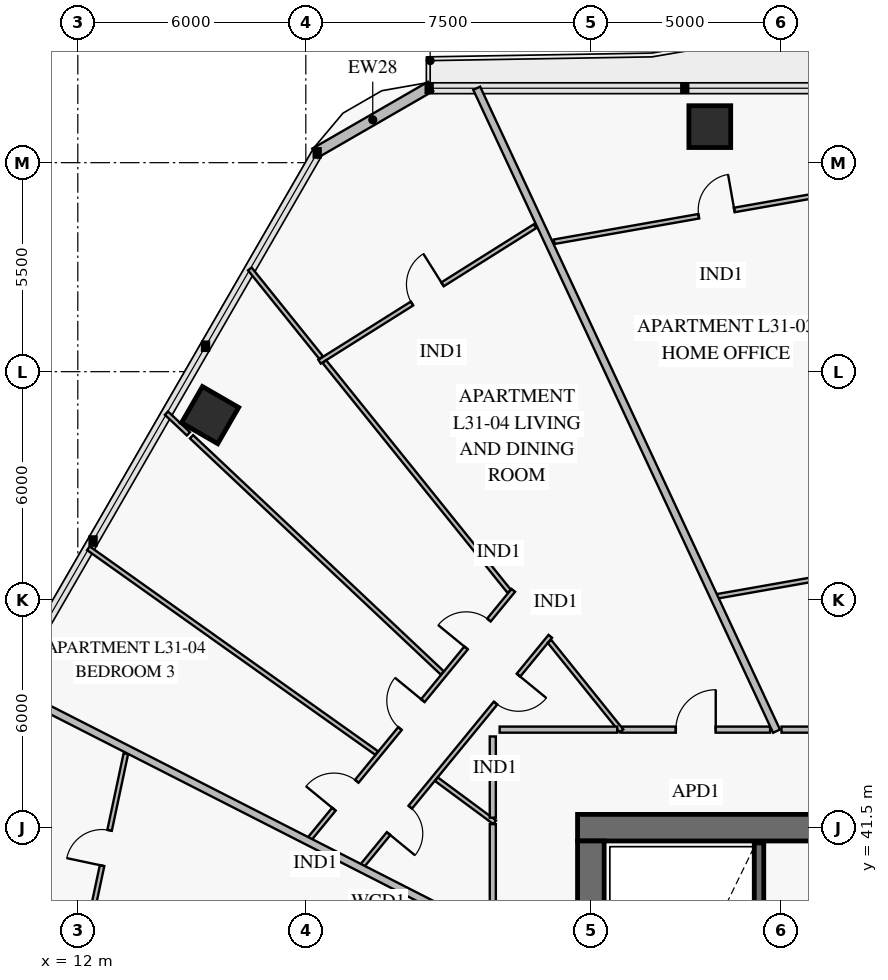
"""IFC4 building model, lengths in metres.
Left out: names, types, materials, properties, quantities, classifications, styles, units other than length and angle.
Written with IfcOpenShell. Run it as: python <this file> out.ifc"""

import sys

from ifc_helpers import new_model, si_unit, direction, frame, frame_2d, origin, origin_2d, place, context, subcontext, project, spatial, rectangle, extrude, element, fill, save


model = new_model("IFC4")
c1 = context("Model", 3, precision=1e-05, world=origin(), true_north=direction((0.0, 1.0)))
c2 = subcontext(c1, "Body", "Model", "MODEL_VIEW")
j1 = project(units=[si_unit("LENGTHUNIT", "METRE"), si_unit("PLANEANGLEUNIT", "RADIAN")], contexts=[c1])
p1 = place(None, origin())
s1 = spatial("IfcSite", under=j1, at=p1, CompositionType="ELEMENT")
p2 = place(p1, origin())
s2 = spatial("IfcBuilding", under=s1, at=p2, CompositionType="ELEMENT")
p3 = place(p2, frame((0.0, 0.0, 126.6)))
s3 = spatial("IfcBuildingStorey", under=s2, at=p3, CompositionType="ELEMENT", Elevation=126.6)
p4 = place(p3, frame((36.75, 41.5, 0.0), z_axis=(0.0, 0.0, 1.0), x_axis=(-1.0, 0.0, 0.0)))
e1 = element("IfcWall", 1, at=p4, inside=s3, PredefinedType="SHEAR", context=c2, shape_type="SweptSolid", body=[
    extrude(rectangle(XDim=11.6, YDim=0.7, at=frame_2d((5.8, 0.0))), origin(), (0.0, 0.0, 1.0), 3.8),
])
p5 = place(p4, frame((4.25, 0.0, 0.0)))
e2 = element("IfcOpeningElement", 2, at=p5, cuts=e1, PredefinedType="OPENING", context=c2, shape_type="SweptSolid", body=[
    extrude(rectangle(XDim=1.1, YDim=2.15, at=frame_2d((0.55, 1.075))), frame((0.0, 0.362, 0.0), z_axis=(0.0, -1.0, 0.0), x_axis=(1.0, 0.0, 0.0)), (0.0, 0.0, 1.0), 0.724),
])
p6 = place(p3, frame((25.5, 22.85, 0.0), z_axis=(0.0, 0.0, 1.0), x_axis=(0.0, 1.0, 0.0)))
e3 = element("IfcWall", 3, at=p6, inside=s3, PredefinedType="SHEAR", context=c2, shape_type="SweptSolid", body=[
    extrude(rectangle(XDim=18.3, YDim=0.7, at=frame_2d((9.15, 0.0))), origin(), (0.0, 0.0, 1.0), 3.8),
])
p7 = place(p6, frame((8.9, 0.0, 0.0)))
e4 = element("IfcOpeningElement", 4, at=p7, cuts=e3, PredefinedType="OPENING", context=c2, shape_type="SweptSolid", body=[
    extrude(rectangle(XDim=1.1, YDim=2.15, at=frame_2d((0.55, 1.075))), frame((0.0, 0.362, 0.0), z_axis=(0.0, -1.0, 0.0), x_axis=(1.0, 0.0, 0.0)), (0.0, 0.0, 1.0), 0.724),
])
for number, where, z_axis, x_axis in (
    (5, (28.63, 59.948, 0.0), (0.0, 0.0, 1.0), (-1.0, 0.0, 0.0)),
    (6, (15.481, 52.357, 0.0), (0.0, 0.0, 1.0), (-0.5, -0.866, 0.0)),
):
    element("IfcColumn", number, at=place(p3, frame(where, z_axis=z_axis, x_axis=x_axis)), inside=s3, PredefinedType="COLUMN", context=c2, shape_type="SweptSolid", body=[
        extrude(rectangle(XDim=1.1, YDim=1.1, at=origin_2d()), origin(), (0.0, 0.0, 1.0), 3.55),
    ])
p8 = place(p3, frame((18.239, 59.249, 0.0), z_axis=(0.0, 0.0, 1.0), x_axis=(0.866007452331, 0.500031091541, 0.0)))
e7 = element("IfcWall", 7, at=p8, inside=s3, PredefinedType="SOLIDWALL", context=c2, shape_type="SweptSolid", body=[
    extrude(rectangle(XDim=3.515, YDim=0.28, at=frame_2d((1.757, 0.0))), origin(), (0.0, 0.0, 1.0), 3.55),
])
p9 = place(p3, frame((29.925, 31.4, 0.0), z_axis=(0.0, 0.0, 1.0), x_axis=(0.0, 1.0, 0.0)))
e8 = element("IfcWall", 8, at=p9, inside=s3, PredefinedType="SOLIDWALL", context=c2, shape_type="SweptSolid", body=[
    extrude(rectangle(XDim=9.7, YDim=0.25, at=frame_2d((4.85, 0.0))), origin(), (0.0, 0.0, 1.0), 3.8),
])
p10 = place(p3, frame((32.915, 58.397, 0.0), z_axis=(0.0, 0.0, 1.0), x_axis=(-0.984808385469, -0.17364459079, 0.0)))
e9 = element("IfcWall", 9, at=p10, inside=s3, PredefinedType="PARTITIONING", context=c2, shape_type="SweptSolid", body=[
    extrude(rectangle(XDim=8.51, YDim=0.12, at=frame_2d((4.255, 0.0))), origin(), (0.0, 0.0, 1.0), 2.85),
])
p11 = place(p10, frame((3.696, 0.0, 0.0)))
e10 = element("IfcOpeningElement", 10, at=p11, cuts=e9, PredefinedType="OPENING", context=c2, shape_type="SweptSolid", body=[
    extrude(rectangle(XDim=0.95, YDim=2.1, at=frame_2d((0.475, 1.05))), frame((0.0, 0.072, 0.0), z_axis=(0.0, -1.0, 0.0), x_axis=(1.0, 0.0, 0.0)), (0.0, 0.0, 1.0), 0.144),
])
p12 = place(p3, frame((24.03, 57.328, 0.0), z_axis=(0.0, 0.0, 1.0), x_axis=(-0.846561448229, -0.532291005346, 0.0)))
e11 = element("IfcWall", 11, at=p12, inside=s3, PredefinedType="PARTITIONING", context=c2, shape_type="SweptSolid", body=[
    extrude(rectangle(XDim=6.697, YDim=0.12, at=frame_2d((3.348, 0.0))), origin(), (0.0, 0.0, 1.0), 2.8),
])
p13 = place(p12, frame((2.873, 0.0, 0.0)))
e12 = element("IfcOpeningElement", 12, at=p13, cuts=e11, PredefinedType="OPENING", context=c2, shape_type="SweptSolid", body=[
    extrude(rectangle(XDim=0.95, YDim=2.1, at=frame_2d((0.475, 1.05))), frame((0.0, 0.072, 0.0), z_axis=(0.0, -1.0, 0.0), x_axis=(1.0, 0.0, 0.0)), (0.0, 0.0, 1.0), 0.144),
])
p14 = place(p3, frame((24.433, 46.536, 0.0), z_axis=(0.0, 0.0, 1.0), x_axis=(-0.633934690798, -0.773386583671, 0.0)))
e13 = element("IfcWall", 13, at=p14, inside=s3, PredefinedType="PARTITIONING", context=c2, shape_type="SweptSolid", body=[
    extrude(rectangle(XDim=7.819, YDim=0.12, at=frame_2d((3.909, 0.0))), origin(), (0.0, 0.0, 1.0), 2.85),
])
p15 = place(p14, frame((1.321, 0.0, 0.0)))
e14 = element("IfcOpeningElement", 14, at=p15, cuts=e13, PredefinedType="OPENING", context=c2, shape_type="SweptSolid", body=[
    extrude(rectangle(XDim=0.95, YDim=2.1, at=frame_2d((0.475, 1.05))), frame((0.0, 0.072, 0.0), z_axis=(0.0, -1.0, 0.0), x_axis=(1.0, 0.0, 0.0)), (0.0, 0.0, 1.0), 0.144),
])
p16 = place(p14, frame((5.813, 0.0, 0.0)))
e15 = element("IfcOpeningElement", 15, at=p16, cuts=e13, PredefinedType="OPENING", context=c2, shape_type="SweptSolid", body=[
    extrude(rectangle(XDim=0.9, YDim=2.1, at=frame_2d((0.45, 1.05))), frame((0.0, 0.072, 0.0), z_axis=(0.0, -1.0, 0.0), x_axis=(1.0, 0.0, 0.0)), (0.0, 0.0, 1.0), 0.144),
])
p17 = place(p3, frame((23.459, 47.746, 0.0), z_axis=(0.0, 0.0, 1.0), x_axis=(-0.633918329218, -0.773399994751, 0.0)))
e16 = element("IfcWall", 16, at=p17, inside=s3, PredefinedType="PARTITIONING", context=c2, shape_type="SweptSolid", body=[
    extrude(rectangle(XDim=8.456, YDim=0.12, at=frame_2d((4.228, 0.0))), origin(), (0.0, 0.0, 1.0), 2.85),
])
p18 = place(p17, frame((1.01, 0.0, 0.0)))
e17 = element("IfcOpeningElement", 17, at=p18, cuts=e16, PredefinedType="OPENING", context=c2, shape_type="SweptSolid", body=[
    extrude(rectangle(XDim=0.95, YDim=2.1, at=frame_2d((0.475, 1.05))), frame((0.0, 0.072, 0.0), z_axis=(0.0, -1.0, 0.0), x_axis=(1.0, 0.0, 0.0)), (0.0, 0.0, 1.0), 0.144),
])
p19 = place(p17, frame((3.753, 0.0, 0.0)))
e18 = element("IfcOpeningElement", 18, at=p19, cuts=e16, PredefinedType="OPENING", context=c2, shape_type="SweptSolid", body=[
    extrude(rectangle(XDim=0.95, YDim=2.1, at=frame_2d((0.475, 1.05))), frame((0.0, 0.072, 0.0), z_axis=(0.0, -1.0, 0.0), x_axis=(1.0, 0.0, 0.0)), (0.0, 0.0, 1.0), 0.144),
])
p20 = place(p17, frame((6.496, 0.0, 0.0)))
e19 = element("IfcOpeningElement", 19, at=p20, cuts=e16, PredefinedType="OPENING", context=c2, shape_type="SweptSolid", body=[
    extrude(rectangle(XDim=0.95, YDim=2.1, at=frame_2d((0.475, 1.05))), frame((0.0, 0.072, 0.0), z_axis=(0.0, -1.0, 0.0), x_axis=(1.0, 0.0, 0.0)), (0.0, 0.0, 1.0), 0.144),
])
p21 = place(p3, frame((30.216, 44.08, 0.0), z_axis=(0.0, 0.0, 1.0), x_axis=(-1.0, 0.0, 0.0)))
e20 = element("IfcWall", 20, at=p21, inside=s3, PredefinedType="PARTITIONING", context=c2, shape_type="SweptSolid", body=[
    extrude(rectangle(XDim=3.91, YDim=0.16, at=frame_2d((1.955, 0.0))), origin(), (0.0, 0.0, 1.0), 3.55),
])
p22 = place(p21, frame((1.43, 0.0, 0.0)))
e21 = element("IfcOpeningElement", 21, at=p22, cuts=e20, PredefinedType="OPENING", context=c2, shape_type="SweptSolid", body=[
    extrude(rectangle(XDim=1.05, YDim=2.15, at=frame_2d((0.525, 1.075))), frame((0.0, 0.092, 0.0), z_axis=(0.0, -1.0, 0.0), x_axis=(1.0, 0.0, 0.0)), (0.0, 0.0, 1.0), 0.184),
])
p23 = place(p3, frame((13.265, 43.447, 0.0), z_axis=(0.0, 0.0, 1.0), x_axis=(-0.207901923905, -0.978149676704, 0.0)))
e22 = element("IfcWall", 22, at=p23, inside=s3, PredefinedType="PARTITIONING", context=c2, shape_type="SweptSolid", body=[
    extrude(rectangle(XDim=5.073, YDim=0.12, at=frame_2d((2.537, 0.0))), origin(), (0.0, 0.0, 1.0), 2.85),
])
p24 = place(p23, frame((2.062, 0.0, 0.0)))
e23 = element("IfcOpeningElement", 23, at=p24, cuts=e22, PredefinedType="OPENING", context=c2, shape_type="SweptSolid", body=[
    extrude(rectangle(XDim=0.95, YDim=2.1, at=frame_2d((0.475, 1.05))), frame((0.0, 0.072, 0.0), z_axis=(0.0, -1.0, 0.0), x_axis=(1.0, 0.0, 0.0)), (0.0, 0.0, 1.0), 0.144),
])
p25 = place(p3, frame((34.045, 48.509, 0.0), z_axis=(0.0, 0.0, 1.0), x_axis=(-0.984807496737, -0.173649631067, 0.0)))
e24 = element("IfcWall", 24, at=p25, inside=s3, PredefinedType="PARTITIONING", context=c2, shape_type="SweptSolid", body=[
    extrude(rectangle(XDim=5.337, YDim=0.12, at=frame_2d((2.668, 0.0))), origin(), (0.0, 0.0, 1.0), 2.85),
])
p26 = place(p3, frame((30.386, 44.04, 0.0), z_axis=(0.0, 0.0, 1.0), x_axis=(-0.422626983595, 0.906303719918, 0.0)))
e25 = element("IfcWall", 25, at=p26, inside=s3, PredefinedType="PARTITIONING", context=c2, shape_type="SweptSolid", body=[
    extrude(rectangle(XDim=18.667, YDim=0.2, at=frame_2d((9.334, 0.0))), origin(), (0.0, 0.0, 1.0), 2.8),
])
p27 = place(p3, frame((22.97, 41.641, 0.0), z_axis=(0.0, 0.0, 1.0), x_axis=(-0.803872525984, 0.59480161564, 0.0)))
e26 = element("IfcWall", 26, at=p27, inside=s3, PredefinedType="PARTITIONING", context=c2, shape_type="SweptSolid", body=[
    extrude(rectangle(XDim=1.906, YDim=0.12, at=frame_2d((0.953, 0.0))), origin(), (0.0, 0.0, 1.0), 3.55),
])
p28 = place(p3, frame((21.59, 45.573, 0.0), z_axis=(0.0, 0.0, 1.0), x_axis=(-0.727936592343, 0.685644454165, 0.0)))
e27 = element("IfcWall", 27, at=p28, inside=s3, PredefinedType="PARTITIONING", context=c2, shape_type="SweptSolid", body=[
    extrude(rectangle(XDim=9.063, YDim=0.12, at=frame_2d((4.532, 0.0))), origin(), (0.0, 0.0, 1.0), 2.8),
])
p29 = place(p3, frame((14.911, 51.864, 0.0), z_axis=(0.0, 0.0, 1.0), x_axis=(-0.72785685355, 0.68572910157, 0.0)))
e28 = element("IfcWall", 28, at=p29, inside=s3, PredefinedType="PARTITIONING", context=c2, shape_type="SweptSolid", body=[
    extrude(rectangle(XDim=0.794, YDim=0.12, at=frame_2d((0.397, 0.0))), origin(), (0.0, 0.0, 1.0), 3.55),
])
p30 = place(p3, frame((19.863, 43.465, 0.0), z_axis=(0.0, 0.0, 1.0), x_axis=(-0.815192148017, 0.579190609222, 0.0)))
e29 = element("IfcWall", 29, at=p30, inside=s3, PredefinedType="PARTITIONING", context=c2, shape_type="SweptSolid", body=[
    extrude(rectangle(XDim=9.302, YDim=0.12, at=frame_2d((4.651, 0.0))), origin(), (0.0, 0.0, 1.0), 2.8),
])
p31 = place(p3, frame((26.306, 44.048, 0.0), z_axis=(0.0, 0.0, 1.0), x_axis=(-0.626850349404, 0.779139679038, 0.0)))
e30 = element("IfcWall", 30, at=p31, inside=s3, PredefinedType="PARTITIONING", context=c2, shape_type="SweptSolid", body=[
    extrude(rectangle(XDim=3.022, YDim=0.12, at=frame_2d((1.511, 0.0))), origin(), (0.0, 0.0, 1.0), 3.55),
])
p32 = place(p3, frame((23.351, 47.721, 0.0), z_axis=(0.0, 0.0, 1.0), x_axis=(-0.62686542239, 0.779127551952, 0.0)))
e31 = element("IfcWall", 31, at=p32, inside=s3, PredefinedType="PARTITIONING", context=c2, shape_type="SweptSolid", body=[
    extrude(rectangle(XDim=7.756, YDim=0.12, at=frame_2d((3.878, 0.0))), origin(), (0.0, 0.0, 1.0), 3.1),
])
p33 = place(p3, frame((18.403, 53.87, 0.0), z_axis=(0.0, 0.0, 1.0), x_axis=(-0.626889927329, 0.779107835292, 0.0)))
e32 = element("IfcWall", 32, at=p33, inside=s3, PredefinedType="PARTITIONING", context=c2, shape_type="SweptSolid", body=[
    extrude(rectangle(XDim=2.994, YDim=0.12, at=frame_2d((1.497, 0.0))), origin(), (0.0, 0.0, 1.0), 2.8),
])
p34 = place(p3, frame((22.96, 38.644, 0.0), z_axis=(0.0, 0.0, 1.0), x_axis=(-0.891012124705, 0.453979507939, 0.0)))
e33 = element("IfcWall", 33, at=p34, inside=s3, PredefinedType="PARTITIONING", context=c2, shape_type="SweptSolid", body=[
    extrude(rectangle(XDim=14.363, YDim=0.2, at=frame_2d((7.182, 0.0))), origin(), (0.0, 0.0, 1.0), 2.8),
])
p35 = place(p3, frame((34.551, 44.08, 0.0), z_axis=(0.0, 0.0, 1.0), x_axis=(-1.0, 0.0, 0.0)))
e34 = element("IfcWall", 34, at=p35, inside=s3, PredefinedType="PARTITIONING", context=c2, shape_type="SweptSolid", body=[
    extrude(rectangle(XDim=4.034, YDim=0.16, at=frame_2d((2.017, 0.0))), origin(), (0.0, 0.0, 1.0), 2.85),
])
p36 = place(p3, frame((26.193, 44.08, 0.0), z_axis=(0.0, 0.0, 1.0), x_axis=(-1.0, 0.0, 0.0)))
e35 = element("IfcWall", 35, at=p36, inside=s3, PredefinedType="PARTITIONING", context=c2, shape_type="SweptSolid", body=[
    extrude(rectangle(XDim=3.093, YDim=0.16, at=frame_2d((1.546, 0.0))), origin(), (0.0, 0.0, 1.0), 2.85),
])
p37 = place(p3, frame((22.92, 43.9, 0.0), z_axis=(0.0, 0.0, 1.0), x_axis=(0.0, -1.0, 0.0)))
e36 = element("IfcWall", 36, at=p37, inside=s3, PredefinedType="PARTITIONING", context=c2, shape_type="SweptSolid", body=[
    extrude(rectangle(XDim=2.137, YDim=0.16, at=frame_2d((1.069, 0.0))), origin(), (0.0, 0.0, 1.0), 3.55),
])
p38 = place(p3, frame((22.92, 41.594, 0.0), z_axis=(0.0, 0.0, 1.0), x_axis=(0.0, -1.0, 0.0)))
e37 = element("IfcWall", 37, at=p38, inside=s3, PredefinedType="PARTITIONING", context=c2, shape_type="SweptSolid", body=[
    extrude(rectangle(XDim=2.762, YDim=0.16, at=frame_2d((1.381, 0.0))), origin(), (0.0, 0.0, 1.0), 3.55),
])
p39 = place(p11, frame((0.95, 0.0, 0.0), z_axis=(0.0, 0.0, 1.0), x_axis=(-1.0, 0.0, 0.0)))
e38 = element("IfcDoor", 38, at=p39, inside=s3, OperationType="SINGLE_SWING_RIGHT", PredefinedType="DOOR", context=c2, shape_type="SweptSolid", body=[
    extrude(rectangle(XDim=0.95, YDim=2.1, at=frame_2d((0.475, 1.05))), frame((0.0, 0.025, 0.0), z_axis=(0.0, -1.0, 0.0), x_axis=(1.0, 0.0, 0.0)), (0.0, 0.0, 1.0), 0.05),
])
fill(e10, e38)
p40 = place(p13, frame((0.95, 0.0, 0.0), z_axis=(0.0, 0.0, 1.0), x_axis=(-1.0, 0.0, 0.0)))
e39 = element("IfcDoor", 39, at=p40, inside=s3, OperationType="SINGLE_SWING_RIGHT", PredefinedType="DOOR", context=c2, shape_type="SweptSolid", body=[
    extrude(rectangle(XDim=0.95, YDim=2.1, at=frame_2d((0.475, 1.05))), frame((0.0, 0.025, 0.0), z_axis=(0.0, -1.0, 0.0), x_axis=(1.0, 0.0, 0.0)), (0.0, 0.0, 1.0), 0.05),
])
fill(e12, e39)
p41 = place(p15, origin())
e40 = element("IfcDoor", 40, at=p41, inside=s3, OperationType="SINGLE_SWING_LEFT", PredefinedType="DOOR", context=c2, shape_type="SweptSolid", body=[
    extrude(rectangle(XDim=0.95, YDim=2.1, at=frame_2d((0.475, 1.05))), frame((0.0, 0.025, 0.0), z_axis=(0.0, -1.0, 0.0), x_axis=(1.0, 0.0, 0.0)), (0.0, 0.0, 1.0), 0.05),
])
fill(e14, e40)
p42 = place(p16, origin())
e41 = element("IfcDoor", 41, at=p42, inside=s3, OperationType="SINGLE_SWING_RIGHT", PredefinedType="DOOR", context=c2, shape_type="SweptSolid", body=[
    extrude(rectangle(XDim=0.9, YDim=2.1, at=frame_2d((0.45, 1.05))), frame((0.0, 0.025, 0.0), z_axis=(0.0, -1.0, 0.0), x_axis=(1.0, 0.0, 0.0)), (0.0, 0.0, 1.0), 0.05),
])
fill(e15, e41)
p43 = place(p18, frame((0.95, 0.0, 0.0), z_axis=(0.0, 0.0, 1.0), x_axis=(-1.0, 0.0, 0.0)))
e42 = element("IfcDoor", 42, at=p43, inside=s3, OperationType="SINGLE_SWING_LEFT", PredefinedType="DOOR", context=c2, shape_type="SweptSolid", body=[
    extrude(rectangle(XDim=0.95, YDim=2.1, at=frame_2d((0.475, 1.05))), frame((0.0, 0.025, 0.0), z_axis=(0.0, -1.0, 0.0), x_axis=(1.0, 0.0, 0.0)), (0.0, 0.0, 1.0), 0.05),
])
fill(e17, e42)
p44 = place(p19, frame((0.95, 0.0, 0.0), z_axis=(0.0, 0.0, 1.0), x_axis=(-1.0, 0.0, 0.0)))
e43 = element("IfcDoor", 43, at=p44, inside=s3, OperationType="SINGLE_SWING_RIGHT", PredefinedType="DOOR", context=c2, shape_type="SweptSolid", body=[
    extrude(rectangle(XDim=0.95, YDim=2.1, at=frame_2d((0.475, 1.05))), frame((0.0, 0.025, 0.0), z_axis=(0.0, -1.0, 0.0), x_axis=(1.0, 0.0, 0.0)), (0.0, 0.0, 1.0), 0.05),
])
fill(e18, e43)
p45 = place(p20, frame((0.95, 0.0, 0.0), z_axis=(0.0, 0.0, 1.0), x_axis=(-1.0, 0.0, 0.0)))
e44 = element("IfcDoor", 44, at=p45, inside=s3, OperationType="SINGLE_SWING_LEFT", PredefinedType="DOOR", context=c2, shape_type="SweptSolid", body=[
    extrude(rectangle(XDim=0.95, YDim=2.1, at=frame_2d((0.475, 1.05))), frame((0.0, 0.025, 0.0), z_axis=(0.0, -1.0, 0.0), x_axis=(1.0, 0.0, 0.0)), (0.0, 0.0, 1.0), 0.05),
])
fill(e19, e44)
p46 = place(p22, frame((1.05, 0.0, 0.0), z_axis=(0.0, 0.0, 1.0), x_axis=(-1.0, 0.0, 0.0)))
e45 = element("IfcDoor", 45, at=p46, inside=s3, OperationType="SINGLE_SWING_RIGHT", PredefinedType="DOOR", context=c2, shape_type="SweptSolid", body=[
    extrude(rectangle(XDim=1.05, YDim=2.15, at=frame_2d((0.525, 1.075))), frame((0.0, 0.025, 0.0), z_axis=(0.0, -1.0, 0.0), x_axis=(1.0, 0.0, 0.0)), (0.0, 0.0, 1.0), 0.05),
])
fill(e21, e45)
p47 = place(p24, frame((0.95, 0.0, 0.0), z_axis=(0.0, 0.0, 1.0), x_axis=(-1.0, 0.0, 0.0)))
e46 = element("IfcDoor", 46, at=p47, inside=s3, OperationType="SINGLE_SWING_LEFT", PredefinedType="DOOR", context=c2, shape_type="SweptSolid", body=[
    extrude(rectangle(XDim=0.95, YDim=2.1, at=frame_2d((0.475, 1.05))), frame((0.0, 0.025, 0.0), z_axis=(0.0, -1.0, 0.0), x_axis=(1.0, 0.0, 0.0)), (0.0, 0.0, 1.0), 0.05),
])
fill(e23, e46)
save(model, sys.argv[1])
